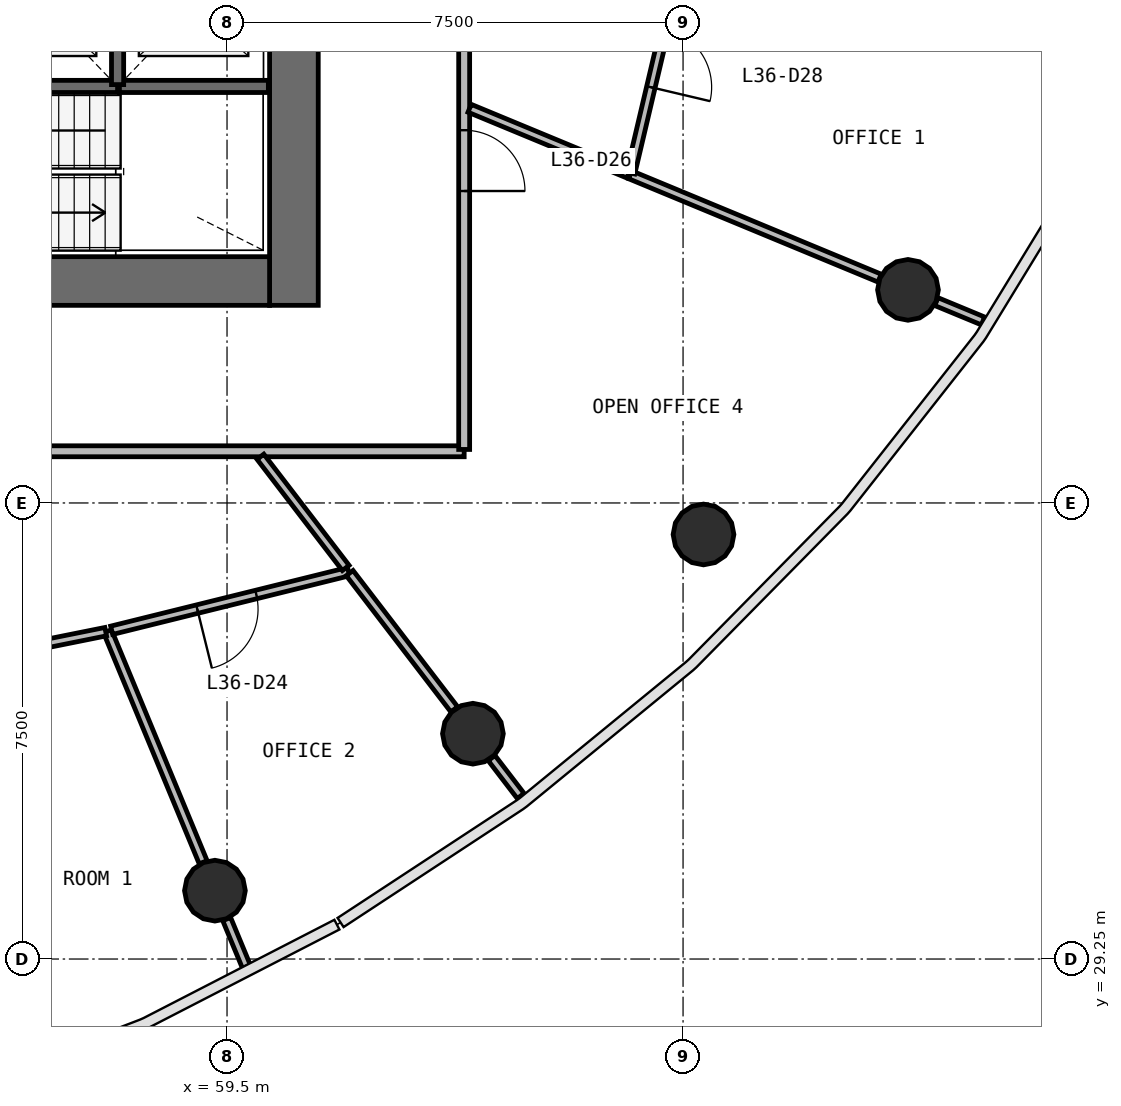
"""IFC4 building model, lengths in metres.
Left out: names, types, materials, properties, quantities, classifications, styles, units other than length and angle.
Written with IfcOpenShell. Run it as: python <this file> out.ifc"""

import sys

from ifc_helpers import new_model, si_unit, direction, frame, frame_2d, origin, origin_2d, place, context, subcontext, project, spatial, rectangle, circle, extrude, source, transform, mapped, element, fill, save


model = new_model("IFC4")
c1 = context("Model", 3, precision=1e-05, world=origin(), true_north=direction((0.0, 1.0)))
c2 = subcontext(c1, "Body", "Model", "MODEL_VIEW")
j1 = project(units=[si_unit("LENGTHUNIT", "METRE"), si_unit("PLANEANGLEUNIT", "RADIAN")], contexts=[c1])
p1 = place(None, origin())
s1 = spatial("IfcSite", under=j1, at=p1, CompositionType="ELEMENT")
p2 = place(p1, origin())
s2 = spatial("IfcBuilding", under=s1, at=p2, CompositionType="ELEMENT")
p3 = place(p2, frame((0.0, 0.0, 152.6)))
s3 = spatial("IfcBuildingStorey", under=s2, at=p3, CompositionType="ELEMENT", Elevation=152.6)
p4 = place(p3, frame((60.6, 40.0, 0.0), z_axis=(0.0, 0.0, 1.0), x_axis=(0.0, 1.0, 0.0)))
e1 = element("IfcWall", 1, at=p4, inside=s3, PredefinedType="SHEAR", context=c2, shape_type="SweptSolid", body=[
    extrude(rectangle(XDim=16.0, YDim=0.8, at=frame_2d((8.0, 0.0))), origin(), (0.0, 0.0, 1.0), 3.9),
])
p5 = place(p4, frame((7.1, 0.0, 0.0)))
e2 = element("IfcOpeningElement", 2, at=p5, cuts=e1, PredefinedType="OPENING", context=c2, shape_type="SweptSolid", body=[
    extrude(rectangle(XDim=1.8, YDim=2.1, at=frame_2d((0.9, 1.05))), frame((0.0, 0.41, 0.0), z_axis=(0.0, -1.0, 0.0), x_axis=(1.0, 0.0, 0.0)), (0.0, 0.0, 1.0), 0.82),
])
p6 = place(p3, frame((43.8, 40.4, 0.0), z_axis=(0.0, 0.0, 1.0), x_axis=(1.0, 0.0, 0.0)))
e3 = element("IfcWall", 3, at=p6, inside=s3, PredefinedType="SHEAR", context=c2, shape_type="SweptSolid", body=[
    extrude(rectangle(XDim=16.4, YDim=0.8, at=frame_2d((8.2, 0.0))), origin(), (0.0, 0.0, 1.0), 3.9),
])
p7 = place(p6, frame((10.1, 0.0, 0.0)))
e4 = element("IfcOpeningElement", 4, at=p7, cuts=e3, PredefinedType="OPENING", context=c2, shape_type="SweptSolid", body=[
    extrude(rectangle(XDim=1.2, YDim=2.1, at=frame_2d((0.6, 1.05))), frame((0.0, 0.41, 0.0), z_axis=(0.0, -1.0, 0.0), x_axis=(1.0, 0.0, 0.0)), (0.0, 0.0, 1.0), 0.82),
])
p8 = place(p6, frame((7.05, 0.0, 0.0)))
e5 = element("IfcOpeningElement", 5, at=p8, cuts=e3, PredefinedType="OPENING", context=c2, shape_type="SweptSolid", body=[
    extrude(rectangle(XDim=1.1, YDim=2.1, at=frame_2d((0.55, 1.05))), frame((0.0, 0.41, 0.0), z_axis=(0.0, -1.0, 0.0), x_axis=(1.0, 0.0, 0.0)), (0.0, 0.0, 1.0), 0.82),
])
p9 = place(p6, frame((0.5, 0.0, 0.0)))
e6 = element("IfcOpeningElement", 6, at=p9, cuts=e3, PredefinedType="OPENING", context=c2, shape_type="SweptSolid", body=[
    extrude(rectangle(XDim=0.8, YDim=2.1, at=frame_2d((0.4, 1.05))), frame((0.0, 0.41, 0.0), z_axis=(0.0, -1.0, 0.0), x_axis=(1.0, 0.0, 0.0)), (0.0, 0.0, 1.0), 0.82),
])
m1 = source(origin(), c2, "Body", "SweptSolid", [
    extrude(circle(Radius=0.5, at=origin_2d()), origin(), (0.0, 0.0, 1.0), 3.9),
])
for number, where, z_axis, x_axis in (
    (7, (59.301, 30.374, 0.0), (0.0, 0.0, 1.0), (1.0, 0.0, 0.0)),
    (8, (63.544, 32.956, 0.0), (0.0, 0.0, 1.0), (1.0, 0.0, 0.0)),
    (9, (67.336, 36.232, 0.0), (0.0, 0.0, 1.0), (1.0, 0.0, 0.0)),
    (10, (70.699, 40.254, 0.0), (0.0, 0.0, 1.0), (1.0, 0.0, 0.0)),
):
    element("IfcColumn", number, at=place(p3, frame(where, z_axis=z_axis, x_axis=x_axis)), inside=s3, PredefinedType="COLUMN", context=c2, shape_type="MappedRepresentation", body=[
        mapped(m1, transform((0.0, 0.0, 0.0), scale=1.0)),
    ])
p10 = place(p3, frame((55.2, 43.6, 0.0), z_axis=(0.0, 0.0, 1.0), x_axis=(1.0, 0.0, 0.0)))
e11 = element("IfcWall", 11, at=p10, inside=s3, PredefinedType="SOLIDWALL", context=c2, shape_type="SweptSolid", body=[
    extrude(rectangle(XDim=2.5, YDim=0.2, at=frame_2d((1.25, 0.0))), origin(), (0.0, 0.0, 1.0), 3.58),
])
p11 = place(p3, frame((57.73, 43.6, 0.0), z_axis=(0.0, 0.0, 1.0), x_axis=(1.0, 0.0, 0.0)))
e12 = element("IfcWall", 12, at=p11, inside=s3, PredefinedType="SOLIDWALL", context=c2, shape_type="SweptSolid", body=[
    extrude(rectangle(XDim=2.45, YDim=0.2, at=frame_2d((1.225, 0.0))), origin(), (0.0, 0.0, 1.0), 3.58),
])
p12 = place(p3, frame((57.7, 43.63, 0.0), z_axis=(0.0, 0.0, 1.0), x_axis=(0.0, 1.0, 0.0)))
e13 = element("IfcWall", 13, at=p12, inside=s3, PredefinedType="SOLIDWALL", context=c2, shape_type="SweptSolid", body=[
    extrude(rectangle(XDim=2.36, YDim=0.2, at=frame_2d((1.18, 0.0))), origin(), (0.0, 0.0, 1.0), 3.58),
])
p13 = place(p3, frame((63.4, 37.6, 0.0), z_axis=(0.0, 0.0, 1.0), x_axis=(-1.0, 0.0, 0.0)))
e14 = element("IfcWall", 14, at=p13, inside=s3, PredefinedType="PARTITIONING", context=c2, shape_type="SweptSolid", body=[
    extrude(rectangle(XDim=22.8, YDim=0.18, at=frame_2d((11.4, 0.0))), origin(), (0.0, 0.0, 1.0), 2.88),
])
p14 = place(p13, frame((16.05, 0.0, 0.0)))
e15 = element("IfcOpeningElement", 15, at=p14, cuts=e14, PredefinedType="OPENING", context=c2, shape_type="SweptSolid", body=[
    extrude(rectangle(XDim=0.9, YDim=2.1, at=frame_2d((0.45, 1.05))), frame((0.0, 0.1, 0.0), z_axis=(0.0, -1.0, 0.0), x_axis=(1.0, 0.0, 0.0)), (0.0, 0.0, 1.0), 0.2),
])
p15 = place(p13, frame((13.05, 0.0, 0.0)))
e16 = element("IfcOpeningElement", 16, at=p15, cuts=e14, PredefinedType="OPENING", context=c2, shape_type="SweptSolid", body=[
    extrude(rectangle(XDim=0.9, YDim=2.1, at=frame_2d((0.45, 1.05))), frame((0.0, 0.1, 0.0), z_axis=(0.0, -1.0, 0.0), x_axis=(1.0, 0.0, 0.0)), (0.0, 0.0, 1.0), 0.2),
])
p16 = place(p13, frame((10.95, 0.0, 0.0)))
e17 = element("IfcOpeningElement", 17, at=p16, cuts=e14, PredefinedType="OPENING", context=c2, shape_type="SweptSolid", body=[
    extrude(rectangle(XDim=1.0, YDim=2.1, at=frame_2d((0.5, 1.05))), frame((0.0, 0.1, 0.0), z_axis=(0.0, -1.0, 0.0), x_axis=(1.0, 0.0, 0.0)), (0.0, 0.0, 1.0), 0.2),
])
p17 = place(p13, frame((19.95, 0.0, 0.0)))
e18 = element("IfcOpeningElement", 18, at=p17, cuts=e14, PredefinedType="OPENING", context=c2, shape_type="SweptSolid", body=[
    extrude(rectangle(XDim=1.0, YDim=2.1, at=frame_2d((0.5, 1.05))), frame((0.0, 0.1, 0.0), z_axis=(0.0, -1.0, 0.0), x_axis=(1.0, 0.0, 0.0)), (0.0, 0.0, 1.0), 0.2),
])
p18 = place(p3, frame((63.4, 58.37, 0.0), z_axis=(0.0, 0.0, 1.0), x_axis=(0.0, -1.0, 0.0)))
e19 = element("IfcWall", 19, at=p18, inside=s3, PredefinedType="PARTITIONING", context=c2, shape_type="SweptSolid", body=[
    extrude(rectangle(XDim=20.74, YDim=0.18, at=frame_2d((10.37, 0.0))), origin(), (0.0, 0.0, 1.0), 2.88),
])
p19 = place(p18, frame((15.49, 0.0, 0.0)))
e20 = element("IfcOpeningElement", 20, at=p19, cuts=e19, PredefinedType="OPENING", context=c2, shape_type="SweptSolid", body=[
    extrude(rectangle(XDim=1.0, YDim=2.1, at=frame_2d((0.5, 1.05))), frame((0.0, 0.1, 0.0), z_axis=(0.0, -1.0, 0.0), x_axis=(1.0, 0.0, 0.0)), (0.0, 0.0, 1.0), 0.2),
])
p20 = place(p18, frame((9.89, 0.0, 0.0)))
e21 = element("IfcOpeningElement", 21, at=p20, cuts=e19, PredefinedType="OPENING", context=c2, shape_type="SweptSolid", body=[
    extrude(rectangle(XDim=1.0, YDim=2.1, at=frame_2d((0.5, 1.05))), frame((0.0, 0.1, 0.0), z_axis=(0.0, -1.0, 0.0), x_axis=(1.0, 0.0, 0.0)), (0.0, 0.0, 1.0), 0.2),
])
p21 = place(p3, frame((66.131, 42.147, 0.0), z_axis=(0.0, 0.0, 1.0), x_axis=(0.923872072557, -0.382701441792, 0.0)))
e22 = element("IfcWall", 22, at=p21, inside=s3, PredefinedType="PARTITIONING", context=c2, shape_type="SweptSolid", body=[
    extrude(rectangle(XDim=4.44, YDim=0.14, at=frame_2d((2.22, 0.0))), origin(), (0.0, 0.0, 1.0), 2.88),
])
p22 = place(p3, frame((57.534, 34.639, 0.0), z_axis=(0.0, 0.0, 1.0), x_axis=(0.382696163026, -0.923874259196, 0.0)))
e23 = element("IfcWall", 23, at=p22, inside=s3, PredefinedType="PARTITIONING", context=c2, shape_type="SweptSolid", body=[
    extrude(rectangle(XDim=4.112, YDim=0.14, at=frame_2d((2.056, 0.0))), origin(), (0.0, 0.0, 1.0), 2.88),
])
p23 = place(p3, frame((61.499, 35.621, 0.0), z_axis=(0.0, 0.0, 1.0), x_axis=(-0.970705214058, -0.240273567836, 0.0)))
e24 = element("IfcWall", 24, at=p23, inside=s3, PredefinedType="PARTITIONING", context=c2, shape_type="SweptSolid", body=[
    extrude(rectangle(XDim=4.014, YDim=0.14, at=frame_2d((2.007, 0.0))), origin(), (0.0, 0.0, 1.0), 2.88),
])
p24 = place(p23, frame((1.563, 0.0, 0.0)))
e25 = element("IfcOpeningElement", 25, at=p24, cuts=e24, PredefinedType="OPENING", context=c2, shape_type="SweptSolid", body=[
    extrude(rectangle(XDim=1.0, YDim=2.1, at=frame_2d((0.5, 1.05))), frame((0.0, 0.08, 0.0), z_axis=(0.0, -1.0, 0.0), x_axis=(1.0, 0.0, 0.0)), (0.0, 0.0, 1.0), 0.16),
])
p25 = place(p3, frame((67.037, 45.99, 0.0), z_axis=(0.0, 0.0, 1.0), x_axis=(-0.229452538662, -0.973319851077, 0.0)))
e26 = element("IfcWall", 26, at=p25, inside=s3, PredefinedType="PARTITIONING", context=c2, shape_type="SweptSolid", body=[
    extrude(rectangle(XDim=3.919, YDim=0.14, at=frame_2d((1.959, 0.0))), origin(), (0.0, 0.0, 1.0), 2.88),
])
p26 = place(p25, frame((1.469, 0.0, 0.0)))
e27 = element("IfcOpeningElement", 27, at=p26, cuts=e26, PredefinedType="OPENING", context=c2, shape_type="SweptSolid", body=[
    extrude(rectangle(XDim=1.0, YDim=2.1, at=frame_2d((0.5, 1.05))), frame((0.0, 0.08, 0.0), z_axis=(0.0, -1.0, 0.0), x_axis=(1.0, 0.0, 0.0)), (0.0, 0.0, 1.0), 0.16),
])
p27 = place(p3, frame((57.505, 34.634, 0.0), z_axis=(0.0, 0.0, 1.0), x_axis=(-0.980399657824, -0.197019062376, 0.0)))
e28 = element("IfcWall", 28, at=p27, inside=s3, PredefinedType="PARTITIONING", context=c2, shape_type="SweptSolid", body=[
    extrude(rectangle(XDim=3.691, YDim=0.14, at=frame_2d((1.846, 0.0))), origin(), (0.0, 0.0, 1.0), 2.88),
])
p28 = place(p27, frame((1.441, 0.0, 0.0)))
e29 = element("IfcOpeningElement", 29, at=p28, cuts=e28, PredefinedType="OPENING", context=c2, shape_type="SweptSolid", body=[
    extrude(rectangle(XDim=1.0, YDim=2.1, at=frame_2d((0.5, 1.05))), frame((0.0, 0.08, 0.0), z_axis=(0.0, -1.0, 0.0), x_axis=(1.0, 0.0, 0.0)), (0.0, 0.0, 1.0), 0.16),
])
p29 = place(p3, frame((63.49, 43.241, 0.0), z_axis=(0.0, 0.0, 1.0), x_axis=(0.923859015747, -0.382732960462, 0.0)))
e30 = element("IfcWall", 30, at=p29, inside=s3, PredefinedType="PARTITIONING", context=c2, shape_type="SweptSolid", body=[
    extrude(rectangle(XDim=2.828, YDim=0.14, at=frame_2d((1.414, 0.0))), origin(), (0.0, 0.0, 1.0), 2.88),
])
p30 = place(p3, frame((61.517, 35.597, 0.0), z_axis=(0.0, 0.0, 1.0), x_axis=(0.608716333524, -0.793387941238, 0.0)))
e31 = element("IfcWall", 31, at=p30, inside=s3, PredefinedType="PARTITIONING", context=c2, shape_type="SweptSolid", body=[
    extrude(rectangle(XDim=2.825, YDim=0.14, at=frame_2d((1.413, 0.0))), origin(), (0.0, 0.0, 1.0), 2.88),
])
p31 = place(p3, frame((60.049, 37.51, 0.0), z_axis=(0.0, 0.0, 1.0), x_axis=(0.608742818772, -0.793367620081, 0.0)))
e32 = element("IfcWall", 32, at=p31, inside=s3, PredefinedType="PARTITIONING", context=c2, shape_type="SweptSolid", body=[
    extrude(rectangle(XDim=2.305, YDim=0.14, at=frame_2d((1.152, 0.0))), origin(), (0.0, 0.0, 1.0), 2.88),
])
p32 = place(p3, frame((59.494, 29.908, 0.0), z_axis=(0.0, 0.0, 1.0), x_axis=(0.382722863119, -0.923863198772, 0.0)))
e33 = element("IfcWall", 33, at=p32, inside=s3, PredefinedType="PARTITIONING", context=c2, shape_type="SweptSolid", body=[
    extrude(rectangle(XDim=0.852, YDim=0.14, at=frame_2d((0.426, 0.0))), origin(), (0.0, 0.0, 1.0), 2.88),
])
p33 = place(p3, frame((71.166, 40.061, 0.0), z_axis=(0.0, 0.0, 1.0), x_axis=(0.923909393783, -0.382611332921, 0.0)))
e34 = element("IfcWall", 34, at=p33, inside=s3, PredefinedType="PARTITIONING", context=c2, shape_type="SweptSolid", body=[
    extrude(rectangle(XDim=0.831, YDim=0.14, at=frame_2d((0.416, 0.0))), origin(), (0.0, 0.0, 1.0), 2.88),
])
p34 = place(p3, frame((63.851, 32.555, 0.0), z_axis=(0.0, 0.0, 1.0), x_axis=(0.608659697441, -0.793431391307, 0.0)))
e35 = element("IfcWall", 35, at=p34, inside=s3, PredefinedType="PARTITIONING", context=c2, shape_type="SweptSolid", body=[
    extrude(rectangle(XDim=0.786, YDim=0.14, at=frame_2d((0.393, 0.0))), origin(), (0.0, 0.0, 1.0), 2.88),
])
m2 = source(origin(), c2, "Body", "SweptSolid", [
    extrude(rectangle(XDim=1.0, YDim=2.1, at=frame_2d((0.5, 1.05))), frame((0.0, 0.025, 0.0), z_axis=(0.0, -1.0, 0.0), x_axis=(1.0, 0.0, 0.0)), (0.0, 0.0, 1.0), 0.05),
])
p35 = place(p24, origin())
e36 = element("IfcDoor", 36, at=p35, inside=s3, OperationType="SINGLE_SWING_RIGHT", PredefinedType="DOOR", context=c2, shape_type="MappedRepresentation", body=[
    mapped(m2, transform((0.0, 0.0, 0.0), scale=1.0)),
])
fill(e25, e36)
p36 = place(p19, origin())
e37 = element("IfcDoor", 37, at=p36, inside=s3, OperationType="SINGLE_SWING_RIGHT", PredefinedType="DOOR", context=c2, shape_type="MappedRepresentation", body=[
    mapped(m2, transform((0.0, 0.0, 0.0), scale=1.0)),
])
fill(e20, e37)
p37 = place(p26, origin())
e38 = element("IfcDoor", 38, at=p37, inside=s3, OperationType="SINGLE_SWING_RIGHT", PredefinedType="DOOR", context=c2, shape_type="MappedRepresentation", body=[
    mapped(m2, transform((0.0, 0.0, 0.0), scale=1.0)),
])
fill(e27, e38)
save(model, sys.argv[1])
